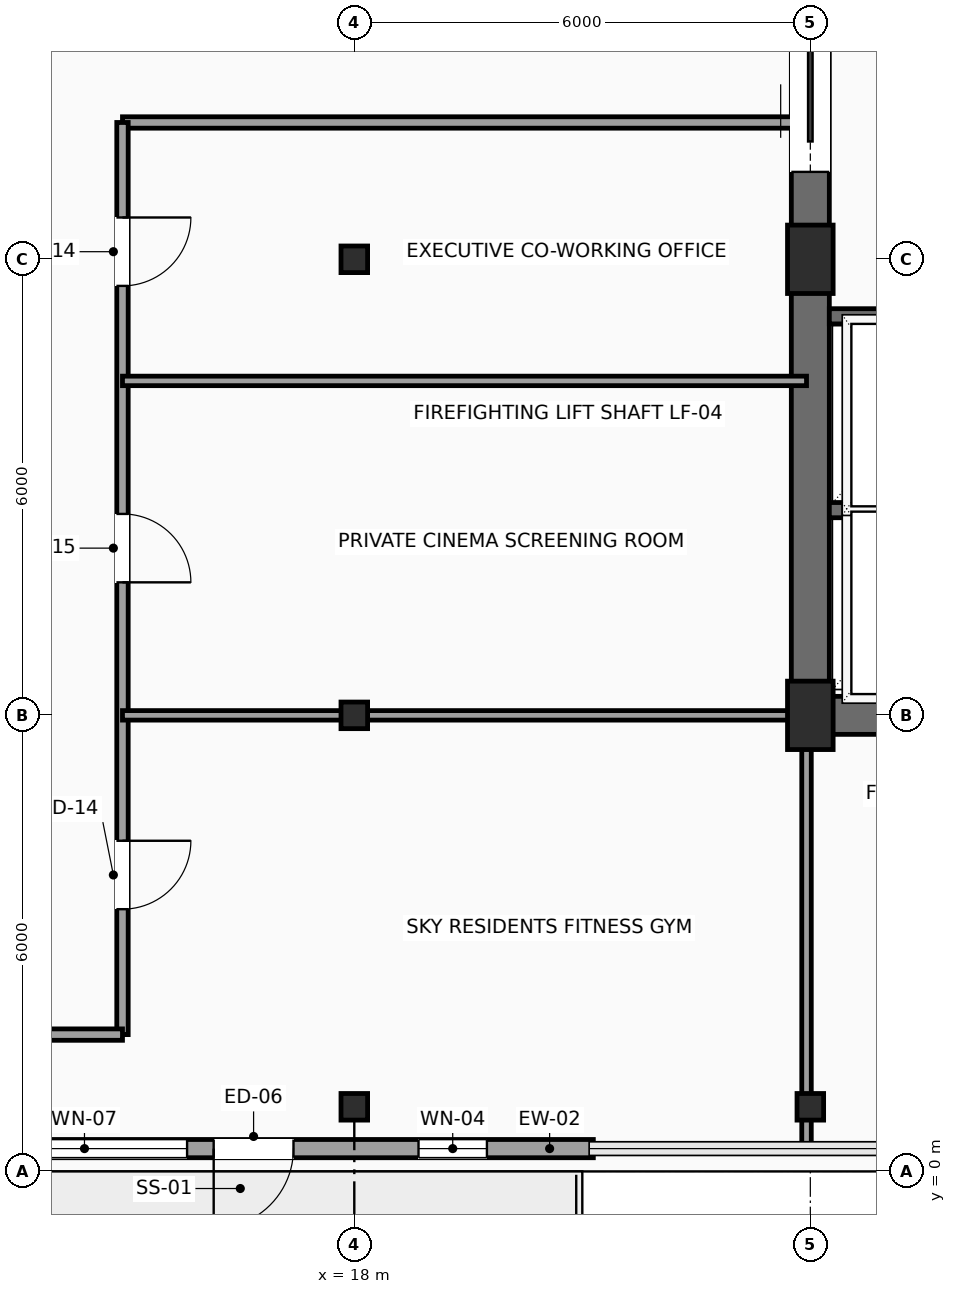
"""IFC4 building model, lengths in metres.
Left out: names, types, materials, properties, quantities, classifications, styles, units other than length and angle.
Written with IfcOpenShell. Run it as: python <this file> out.ifc"""

import sys

from ifc_helpers import new_model, si_unit, direction, frame, frame_2d, origin, origin_2d, place, context, subcontext, project, spatial, rectangle, hollow_rectangle, extrude, element, fill, save


model = new_model("IFC4")
c1 = context("Model", 3, precision=1e-05, world=origin(), true_north=direction((0.0, 1.0)))
c2 = subcontext(c1, "Body", "Model", "MODEL_VIEW")
j1 = project(units=[si_unit("LENGTHUNIT", "METRE"), si_unit("PLANEANGLEUNIT", "RADIAN")], contexts=[c1])
p1 = place(None, origin())
s1 = spatial("IfcSite", under=j1, at=p1, CompositionType="ELEMENT")
p2 = place(p1, origin())
s2 = spatial("IfcBuilding", under=s1, at=p2, CompositionType="ELEMENT")
p3 = place(p2, frame((0.0, 0.0, 264.2)))
s3 = spatial("IfcBuildingStorey", under=s2, at=p3, CompositionType="ELEMENT", Elevation=264.2)
for number, where, z_axis, x_axis in (
    (1, (24.0, 6.0, 0.0), (0.0, 0.0, 1.0), (1.0, 0.0, 0.0)),
    (2, (24.0, 12.0, 0.0), (0.0, 0.0, 1.0), (1.0, 0.0, 0.0)),
):
    element("IfcColumn", number, at=place(p3, frame(where, z_axis=z_axis, x_axis=x_axis)), inside=s3, PredefinedType="COLUMN", context=c2, shape_type="SweptSolid", body=[
        extrude(rectangle(XDim=0.6, YDim=0.9, at=origin_2d()), origin(), (0.0, 0.0, 1.0), 3.5),
    ])
for number, where, z_axis, x_axis in (
    (3, (18.0, 0.85, 0.0), (0.0, 0.0, 1.0), (1.0, 0.0, 0.0)),
    (4, (18.0, 6.0, 0.0), (0.0, 0.0, 1.0), (1.0, 0.0, 0.0)),
    (5, (18.0, 12.0, 0.0), (0.0, 0.0, 1.0), (1.0, 0.0, 0.0)),
    (6, (24.0, 0.85, 0.0), (0.0, 0.0, 1.0), (1.0, 0.0, 0.0)),
):
    element("IfcColumn", number, at=place(p3, frame(where, z_axis=z_axis, x_axis=x_axis)), inside=s3, PredefinedType="COLUMN", context=c2, shape_type="SweptSolid", body=[
        extrude(hollow_rectangle(XDim=0.35, YDim=0.35, WallThickness=0.016, InnerFilletRadius=0.016, OuterFilletRadius=0.032, at=origin_2d()), origin(), (0.0, 0.0, 1.0), 3.5),
    ])
p4 = place(p3, frame((21.145, 0.3, 0.0), z_axis=(0.0, 0.0, 1.0), x_axis=(-1.0, 0.0, 0.0)))
e7 = element("IfcWall", 7, at=p4, inside=s3, PredefinedType="SOLIDWALL", context=c2, shape_type="SweptSolid", body=[
    extrude(rectangle(XDim=9.29, YDim=0.24, at=frame_2d((4.645, 0.0))), origin(), (0.0, 0.0, 1.0), 3.3),
])
p5 = place(p4, frame((3.945, 0.0, 0.0)))
e8 = element("IfcOpeningElement", 8, at=p5, cuts=e7, PredefinedType="OPENING", context=c2, shape_type="SweptSolid", body=[
    extrude(rectangle(XDim=1.05, YDim=2.2, at=frame_2d((0.525, 1.1))), frame((0.0, 0.13, 0.0), z_axis=(0.0, -1.0, 0.0), x_axis=(1.0, 0.0, 0.0)), (0.0, 0.0, 1.0), 0.26),
])
p6 = place(p4, frame((5.345, 0.0, 0.6)))
e9 = element("IfcOpeningElement", 9, at=p6, cuts=e7, PredefinedType="OPENING", context=c2, shape_type="SweptSolid", body=[
    extrude(rectangle(XDim=2.7, YDim=2.3, at=frame_2d((1.35, 1.15))), frame((0.0, 0.13, 0.0), z_axis=(0.0, -1.0, 0.0), x_axis=(1.0, 0.0, 0.0)), (0.0, 0.0, 1.0), 0.26),
])
p7 = place(p4, frame((1.4, 0.0, 0.6)))
e10 = element("IfcOpeningElement", 10, at=p7, cuts=e7, PredefinedType="OPENING", context=c2, shape_type="SweptSolid", body=[
    extrude(rectangle(XDim=0.9, YDim=2.2, at=frame_2d((0.45, 1.1))), frame((0.0, 0.13, 0.0), z_axis=(0.0, -1.0, 0.0), x_axis=(1.0, 0.0, 0.0)), (0.0, 0.0, 1.0), 0.26),
])
p8 = place(p3, frame((24.0, 6.0, 0.0), z_axis=(0.0, 0.0, 1.0), x_axis=(1.0, 0.0, 0.0)))
e11 = element("IfcWall", 11, at=p8, inside=s3, PredefinedType="SHEAR", context=c2, shape_type="SweptSolid", body=[
    extrude(rectangle(XDim=9.6, YDim=0.5, at=frame_2d((4.8, 0.0))), origin(), (0.0, 0.0, 1.0), 3.3),
])
p9 = place(p3, frame((24.0, 6.0, 0.0), z_axis=(0.0, 0.0, 1.0), x_axis=(0.0, 1.0, 0.0)))
e12 = element("IfcWall", 12, at=p9, inside=s3, PredefinedType="SHEAR", context=c2, shape_type="SweptSolid", body=[
    extrude(rectangle(XDim=12.0, YDim=0.5, at=frame_2d((6.0, 0.0))), origin(), (0.0, 0.0, 1.0), 3.3),
])
p10 = place(p9, frame((7.15, 0.0, 0.0)))
e13 = element("IfcOpeningElement", 13, at=p10, cuts=e12, PredefinedType="OPENING", context=c2, shape_type="SweptSolid", body=[
    extrude(rectangle(XDim=1.6, YDim=2.3, at=frame_2d((0.8, 1.15))), frame((0.0, 0.26, 0.0), z_axis=(0.0, -1.0, 0.0), x_axis=(1.0, 0.0, 0.0)), (0.0, 0.0, 1.0), 0.52),
])
for number, where, z_axis, x_axis in (
    (14, (24.25, 8.7, 0.0), (0.0, 0.0, 1.0), (1.0, 0.0, 0.0)),
    (15, (24.25, 11.25, 0.0), (0.0, 0.0, 1.0), (1.0, 0.0, 0.0)),
):
    element("IfcWall", number, at=place(p3, frame(where, z_axis=z_axis, x_axis=x_axis)), inside=s3, PredefinedType="SHEAR", context=c2, shape_type="SweptSolid", body=[
        extrude(rectangle(XDim=2.17, YDim=0.2, at=frame_2d((1.085, 0.0))), origin(), (0.0, 0.0, 1.0), 3.3),
    ])
p11 = place(p3, frame((23.95, 13.8, 0.0), z_axis=(0.0, 0.0, 1.0), x_axis=(-1.0, 0.0, 0.0)))
e16 = element("IfcWall", 16, at=p11, inside=s3, PredefinedType="PARTITIONING", context=c2, shape_type="SweptSolid", body=[
    extrude(rectangle(XDim=9.0, YDim=0.15, at=frame_2d((4.5, 0.0))), origin(), (0.0, 0.0, 1.0), 3.3),
])
p12 = place(p3, frame((14.95, 13.8, 0.0), z_axis=(0.0, 0.0, 1.0), x_axis=(0.0, -1.0, 0.0)))
e17 = element("IfcWall", 17, at=p12, inside=s3, PredefinedType="PARTITIONING", context=c2, shape_type="SweptSolid", body=[
    extrude(rectangle(XDim=12.0, YDim=0.15, at=frame_2d((6.0, 0.0))), origin(), (0.0, 0.0, 1.0), 3.3),
])
p13 = place(p12, frame((9.45, 0.0, 0.0)))
e18 = element("IfcOpeningElement", 18, at=p13, cuts=e17, PredefinedType="OPENING", context=c2, shape_type="SweptSolid", body=[
    extrude(rectangle(XDim=0.9, YDim=2.1, at=frame_2d((0.45, 1.05))), frame((0.0, 0.085, 0.0), z_axis=(0.0, -1.0, 0.0), x_axis=(1.0, 0.0, 0.0)), (0.0, 0.0, 1.0), 0.17),
])
p14 = place(p12, frame((5.15, 0.0, 0.0)))
e19 = element("IfcOpeningElement", 19, at=p14, cuts=e17, PredefinedType="OPENING", context=c2, shape_type="SweptSolid", body=[
    extrude(rectangle(XDim=0.9, YDim=2.1, at=frame_2d((0.45, 1.05))), frame((0.0, 0.085, 0.0), z_axis=(0.0, -1.0, 0.0), x_axis=(1.0, 0.0, 0.0)), (0.0, 0.0, 1.0), 0.17),
])
p15 = place(p12, frame((1.25, 0.0, 0.0)))
e20 = element("IfcOpeningElement", 20, at=p15, cuts=e17, PredefinedType="OPENING", context=c2, shape_type="SweptSolid", body=[
    extrude(rectangle(XDim=0.9, YDim=2.1, at=frame_2d((0.45, 1.05))), frame((0.0, 0.085, 0.0), z_axis=(0.0, -1.0, 0.0), x_axis=(1.0, 0.0, 0.0)), (0.0, 0.0, 1.0), 0.17),
])
p16 = place(p3, frame((14.95, 1.8, 0.0), z_axis=(0.0, 0.0, 1.0), x_axis=(-1.0, 0.0, 0.0)))
e21 = element("IfcWall", 21, at=p16, inside=s3, PredefinedType="PARTITIONING", context=c2, shape_type="SweptSolid", body=[
    extrude(rectangle(XDim=2.35, YDim=0.15, at=frame_2d((1.175, 0.0))), origin(), (0.0, 0.0, 1.0), 3.3),
])
p17 = place(p3, frame((14.95, 6.0, 0.0), z_axis=(0.0, 0.0, 1.0), x_axis=(1.0, 0.0, 0.0)))
e22 = element("IfcWall", 22, at=p17, inside=s3, PredefinedType="PARTITIONING", context=c2, shape_type="SweptSolid", body=[
    extrude(rectangle(XDim=9.0, YDim=0.125, at=frame_2d((4.5, 0.0))), origin(), (0.0, 0.0, 1.0), 2.992),
])
p18 = place(p3, frame((23.95, 0.3, 0.0), z_axis=(0.0, 0.0, 1.0), x_axis=(0.0, 1.0, 0.0)))
e23 = element("IfcWall", 23, at=p18, inside=s3, PredefinedType="PARTITIONING", context=c2, shape_type="SweptSolid", body=[
    extrude(rectangle(XDim=5.7, YDim=0.125, at=frame_2d((2.85, 0.0))), origin(), (0.0, 0.0, 1.0), 2.992),
])
p19 = place(p3, frame((14.95, 10.4, 0.0), z_axis=(0.0, 0.0, 1.0), x_axis=(1.0, 0.0, 0.0)))
e24 = element("IfcWall", 24, at=p19, inside=s3, PredefinedType="PARTITIONING", context=c2, shape_type="SweptSolid", body=[
    extrude(rectangle(XDim=9.0, YDim=0.125, at=frame_2d((4.5, 0.0))), origin(), (0.0, 0.0, 1.0), 3.3),
])
p20 = place(p5, origin())
e25 = element("IfcDoor", 25, at=p20, inside=s3, OperationType="SINGLE_SWING_RIGHT", PredefinedType="DOOR", context=c2, shape_type="SweptSolid", body=[
    extrude(rectangle(XDim=1.05, YDim=2.2, at=frame_2d((0.525, 1.1))), frame((0.0, 0.025, 0.0), z_axis=(0.0, -1.0, 0.0), x_axis=(1.0, 0.0, 0.0)), (0.0, 0.0, 1.0), 0.05),
])
fill(e8, e25)
p21 = place(p6, origin())
e26 = element("IfcWindow", 26, at=p21, inside=s3, PartitioningType="SINGLE_PANEL", PredefinedType="WINDOW", context=c2, shape_type="SweptSolid", body=[
    extrude(rectangle(XDim=2.7, YDim=2.3, at=frame_2d((1.35, 1.15))), frame((0.0, 0.03, 0.0), z_axis=(0.0, -1.0, 0.0), x_axis=(1.0, 0.0, 0.0)), (0.0, 0.0, 1.0), 0.06),
])
fill(e9, e26)
p22 = place(p7, origin())
e27 = element("IfcWindow", 27, at=p22, inside=s3, PartitioningType="SINGLE_PANEL", PredefinedType="WINDOW", context=c2, shape_type="SweptSolid", body=[
    extrude(rectangle(XDim=0.9, YDim=2.2, at=frame_2d((0.45, 1.1))), frame((0.0, 0.03, 0.0), z_axis=(0.0, -1.0, 0.0), x_axis=(1.0, 0.0, 0.0)), (0.0, 0.0, 1.0), 0.06),
])
fill(e10, e27)
p23 = place(p10, origin())
e28 = element("IfcDoor", 28, at=p23, inside=s3, OperationType="DOUBLE_DOOR_SLIDING", PredefinedType="DOOR", context=c2, shape_type="SweptSolid", body=[
    extrude(rectangle(XDim=1.6, YDim=2.3, at=frame_2d((0.8, 1.15))), frame((0.0, 0.025, 0.0), z_axis=(0.0, -1.0, 0.0), x_axis=(1.0, 0.0, 0.0)), (0.0, 0.0, 1.0), 0.05),
])
fill(e13, e28)
p24 = place(p13, origin())
e29 = element("IfcDoor", 29, at=p24, inside=s3, OperationType="SINGLE_SWING_LEFT", PredefinedType="DOOR", context=c2, shape_type="SweptSolid", body=[
    extrude(rectangle(XDim=0.9, YDim=2.1, at=frame_2d((0.45, 1.05))), frame((0.0, 0.025, 0.0), z_axis=(0.0, -1.0, 0.0), x_axis=(1.0, 0.0, 0.0)), (0.0, 0.0, 1.0), 0.05),
])
fill(e18, e29)
p25 = place(p14, origin())
e30 = element("IfcDoor", 30, at=p25, inside=s3, OperationType="SINGLE_SWING_RIGHT", PredefinedType="DOOR", context=c2, shape_type="SweptSolid", body=[
    extrude(rectangle(XDim=0.9, YDim=2.1, at=frame_2d((0.45, 1.05))), frame((0.0, 0.025, 0.0), z_axis=(0.0, -1.0, 0.0), x_axis=(1.0, 0.0, 0.0)), (0.0, 0.0, 1.0), 0.05),
])
fill(e19, e30)
p26 = place(p15, origin())
e31 = element("IfcDoor", 31, at=p26, inside=s3, OperationType="SINGLE_SWING_LEFT", PredefinedType="DOOR", context=c2, shape_type="SweptSolid", body=[
    extrude(rectangle(XDim=0.9, YDim=2.1, at=frame_2d((0.45, 1.05))), frame((0.0, 0.025, 0.0), z_axis=(0.0, -1.0, 0.0), x_axis=(1.0, 0.0, 0.0)), (0.0, 0.0, 1.0), 0.05),
])
fill(e20, e31)
save(model, sys.argv[1])
